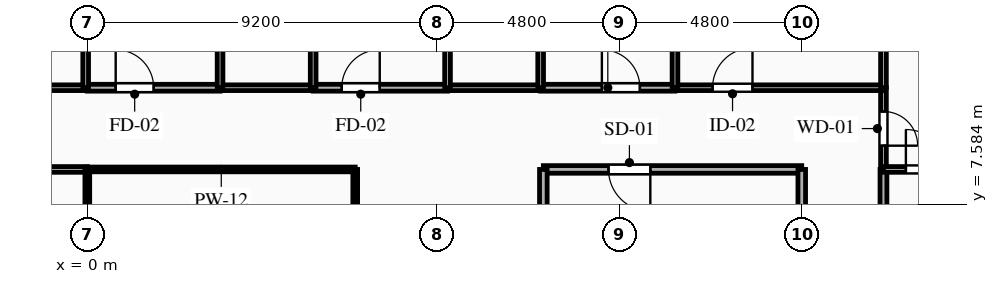
"""IFC4 building model, lengths in metres.
Left out: names, types, materials, properties, quantities, classifications, styles, units other than length and angle.
Written with IfcOpenShell. Run it as: python <this file> out.ifc"""

import sys

from ifc_helpers import new_model, si_unit, direction, frame, frame_2d, origin, place, context, subcontext, project, spatial, rectangle, extrude, element, fill, save


model = new_model("IFC4")
c1 = context("Model", 3, precision=1e-05, world=origin(), true_north=direction((0.0, 1.0)))
c2 = subcontext(c1, "Body", "Model", "MODEL_VIEW")
j1 = project(units=[si_unit("LENGTHUNIT", "METRE"), si_unit("PLANEANGLEUNIT", "RADIAN")], contexts=[c1])
p1 = place(None, origin())
s1 = spatial("IfcSite", under=j1, at=p1, CompositionType="ELEMENT")
p2 = place(p1, origin())
s2 = spatial("IfcBuilding", under=s1, at=p2, CompositionType="ELEMENT")
p3 = place(p2, frame((0.0, 0.0, 134.35)))
s3 = spatial("IfcBuildingStorey", under=s2, at=p3, CompositionType="ELEMENT", Elevation=134.35)
p4 = place(p3, frame((18.8, 8.5, 0.0), z_axis=(0.0, 0.0, 1.0), x_axis=(-1.0, 0.0, 0.0)))
e1 = element("IfcWall", 1, at=p4, inside=s3, PredefinedType="PARTITIONING", context=c2, shape_type="SweptSolid", body=[
    extrude(rectangle(XDim=6.8, YDim=0.2, at=frame_2d((3.4, 0.0))), origin(), (0.0, 0.0, 1.0), 3.04),
])
p5 = place(p4, frame((3.985, 0.0, 0.0)))
e2 = element("IfcOpeningElement", 2, at=p5, cuts=e1, PredefinedType="OPENING", context=c2, shape_type="SweptSolid", body=[
    extrude(rectangle(XDim=1.1, YDim=2.15, at=frame_2d((0.55, 1.075))), frame((0.0, 0.11, 0.0), z_axis=(0.0, -1.0, 0.0), x_axis=(1.0, 0.0, 0.0)), (0.0, 0.0, 1.0), 0.22),
])
p6 = place(p3, frame((18.8, 5.6, 0.0), z_axis=(0.0, 0.0, 1.0), x_axis=(0.0, 1.0, 0.0)))
e3 = element("IfcWall", 3, at=p6, inside=s3, PredefinedType="PARTITIONING", context=c2, shape_type="SweptSolid", body=[
    extrude(rectangle(XDim=2.9, YDim=0.2, at=frame_2d((1.45, 0.0))), origin(), (0.0, 0.0, 1.0), 2.525),
])
p7 = place(p3, frame((12.0, 8.5, 0.0), z_axis=(0.0, 0.0, 1.0), x_axis=(0.0, -1.0, 0.0)))
e4 = element("IfcWall", 4, at=p7, inside=s3, PredefinedType="PARTITIONING", context=c2, shape_type="SweptSolid", body=[
    extrude(rectangle(XDim=2.9, YDim=0.2, at=frame_2d((1.45, 0.0))), origin(), (0.0, 0.0, 1.0), 3.04),
])
p8 = place(p3, frame((-2.493, 10.65, 0.0), z_axis=(0.0, 0.0, 1.0), x_axis=(1.0, 0.0, 0.0)))
e5 = element("IfcWall", 5, at=p8, inside=s3, PredefinedType="PLUMBINGWALL", context=c2, shape_type="SweptSolid", body=[
    extrude(rectangle(XDim=2.45, YDim=0.15, at=frame_2d((1.225, 0.0))), origin(), (0.0, 0.0, 1.0), 3.04),
])
p9 = place(p3, frame((0.0, 8.5, 0.0), z_axis=(0.0, 0.0, 1.0), x_axis=(-1.0, 0.0, 0.0)))
e6 = element("IfcWall", 6, at=p9, inside=s3, PredefinedType="PARTITIONING", context=c2, shape_type="SweptSolid", body=[
    extrude(rectangle(XDim=7.05, YDim=0.15, at=frame_2d((3.525, 0.0))), origin(), (0.0, 0.0, 1.0), 3.04),
])
p10 = place(p3, frame((20.95, 10.65, 0.0), z_axis=(0.0, 0.0, 1.0), x_axis=(0.0, -1.0, 0.0)))
e7 = element("IfcWall", 7, at=p10, inside=s3, PredefinedType="PARTITIONING", context=c2, shape_type="SweptSolid", body=[
    extrude(rectangle(XDim=2.15, YDim=0.15, at=frame_2d((1.075, 0.0))), origin(), (0.0, 0.0, 1.0), 3.04),
])
p11 = place(p10, frame((0.625, 0.0, 0.0)))
e8 = element("IfcOpeningElement", 8, at=p11, cuts=e7, PredefinedType="OPENING", context=c2, shape_type="SweptSolid", body=[
    extrude(rectangle(XDim=0.9, YDim=2.1, at=frame_2d((0.45, 1.05))), frame((0.0, 0.085, 0.0), z_axis=(0.0, -1.0, 0.0), x_axis=(1.0, 0.0, 0.0)), (0.0, 0.0, 1.0), 0.17),
])
p12 = place(p3, frame((0.0, 10.65, 0.0), z_axis=(0.0, 0.0, 1.0), x_axis=(1.0, 0.0, 0.0)))
e9 = element("IfcWall", 9, at=p12, inside=s3, PredefinedType="PARTITIONING", context=c2, shape_type="SweptSolid", body=[
    extrude(rectangle(XDim=3.493, YDim=0.18, at=frame_2d((1.747, 0.0))), origin(), (0.0, 0.0, 1.0), 3.04),
])
p13 = place(p12, frame((0.747, 0.0, 0.0)))
e10 = element("IfcOpeningElement", 10, at=p13, cuts=e9, PredefinedType="OPENING", context=c2, shape_type="SweptSolid", body=[
    extrude(rectangle(XDim=1.0, YDim=2.15, at=frame_2d((0.5, 1.075))), frame((0.0, 0.1, 0.0), z_axis=(0.0, -1.0, 0.0), x_axis=(1.0, 0.0, 0.0)), (0.0, 0.0, 1.0), 0.2),
])
p14 = place(p3, frame((5.943, 10.65, 0.0), z_axis=(0.0, 0.0, 1.0), x_axis=(1.0, 0.0, 0.0)))
e11 = element("IfcWall", 11, at=p14, inside=s3, PredefinedType="PARTITIONING", context=c2, shape_type="SweptSolid", body=[
    extrude(rectangle(XDim=3.536, YDim=0.18, at=frame_2d((1.768, 0.0))), origin(), (0.0, 0.0, 1.0), 3.04),
])
p15 = place(p14, frame((0.752, 0.0, 0.0)))
e12 = element("IfcOpeningElement", 12, at=p15, cuts=e11, PredefinedType="OPENING", context=c2, shape_type="SweptSolid", body=[
    extrude(rectangle(XDim=1.0, YDim=2.15, at=frame_2d((0.5, 1.075))), frame((0.0, 0.1, 0.0), z_axis=(0.0, -1.0, 0.0), x_axis=(1.0, 0.0, 0.0)), (0.0, 0.0, 1.0), 0.2),
])
p16 = place(p3, frame((3.493, 10.65, 0.0), z_axis=(0.0, 0.0, 1.0), x_axis=(1.0, 0.0, 0.0)))
e13 = element("IfcWall", 13, at=p16, inside=s3, PredefinedType="PLUMBINGWALL", context=c2, shape_type="SweptSolid", body=[
    extrude(rectangle(XDim=2.45, YDim=0.15, at=frame_2d((1.225, 0.0))), origin(), (0.0, 0.0, 1.0), 3.04),
])
p17 = place(p3, frame((11.929, 10.65, 0.0), z_axis=(0.0, 0.0, 1.0), x_axis=(1.0, 0.0, 0.0)))
e14 = element("IfcWall", 14, at=p17, inside=s3, PredefinedType="PARTITIONING", context=c2, shape_type="SweptSolid", body=[
    extrude(rectangle(XDim=3.535, YDim=0.18, at=frame_2d((1.768, 0.0))), origin(), (0.0, 0.0, 1.0), 3.04),
])
p18 = place(p17, frame((1.611, 0.0, 0.0)))
e15 = element("IfcOpeningElement", 15, at=p18, cuts=e14, PredefinedType="OPENING", context=c2, shape_type="SweptSolid", body=[
    extrude(rectangle(XDim=1.0, YDim=2.15, at=frame_2d((0.5, 1.075))), frame((0.0, 0.1, 0.0), z_axis=(0.0, -1.0, 0.0), x_axis=(1.0, 0.0, 0.0)), (0.0, 0.0, 1.0), 0.2),
])
p19 = place(p3, frame((9.479, 10.65, 0.0), z_axis=(0.0, 0.0, 1.0), x_axis=(1.0, 0.0, 0.0)))
e16 = element("IfcWall", 16, at=p19, inside=s3, PredefinedType="PLUMBINGWALL", context=c2, shape_type="SweptSolid", body=[
    extrude(rectangle(XDim=2.45, YDim=0.15, at=frame_2d((1.225, 0.0))), origin(), (0.0, 0.0, 1.0), 3.04),
])
p20 = place(p3, frame((15.464, 10.65, 0.0), z_axis=(0.0, 0.0, 1.0), x_axis=(1.0, 0.0, 0.0)))
e17 = element("IfcWall", 17, at=p20, inside=s3, PredefinedType="PARTITIONING", context=c2, shape_type="SweptSolid", body=[
    extrude(rectangle(XDim=5.486, YDim=0.15, at=frame_2d((2.743, 0.0))), origin(), (0.0, 0.0, 1.0), 3.04),
])
p21 = place(p20, frame((0.99, 0.0, 0.0)))
e18 = element("IfcOpeningElement", 18, at=p21, cuts=e17, PredefinedType="OPENING", context=c2, shape_type="SweptSolid", body=[
    extrude(rectangle(XDim=1.05, YDim=2.15, at=frame_2d((0.525, 1.075))), frame((0.0, 0.085, 0.0), z_axis=(0.0, -1.0, 0.0), x_axis=(1.0, 0.0, 0.0)), (0.0, 0.0, 1.0), 0.17),
])
p22 = place(p3, frame((7.05, 8.5, 0.0), z_axis=(0.0, 0.0, 1.0), x_axis=(-1.0, 0.0, 0.0)))
e19 = element("IfcWall", 19, at=p22, inside=s3, PredefinedType="PARTITIONING", context=c2, shape_type="SweptSolid", body=[
    extrude(rectangle(XDim=7.05, YDim=0.125, at=frame_2d((3.525, 0.0))), origin(), (0.0, 0.0, 1.0), 3.04),
])
p23 = place(p3, frame((20.95, 8.5, 0.0), z_axis=(0.0, 0.0, 1.0), x_axis=(0.0, -1.0, 0.0)))
e20 = element("IfcWall", 20, at=p23, inside=s3, PredefinedType="PARTITIONING", context=c2, shape_type="SweptSolid", body=[
    extrude(rectangle(XDim=14.1, YDim=0.18, at=frame_2d((7.05, 0.0))), origin(), (0.0, 0.0, 1.0), 3.04),
])
p24 = place(p23, frame((8.042, 0.0, 0.0)))
e21 = element("IfcOpeningElement", 21, at=p24, cuts=e20, PredefinedType="OPENING", context=c2, shape_type="SweptSolid", body=[
    extrude(rectangle(XDim=1.0, YDim=2.15, at=frame_2d((0.5, 1.075))), frame((0.0, 0.1, 0.0), z_axis=(0.0, -1.0, 0.0), x_axis=(1.0, 0.0, 0.0)), (0.0, 0.0, 1.0), 0.2),
])
p25 = place(p3, frame((7.05, -0.8, 0.0), z_axis=(0.0, 0.0, 1.0), x_axis=(0.0, 1.0, 0.0)))
e22 = element("IfcWall", 22, at=p25, inside=s3, PredefinedType="PARTITIONING", context=c2, shape_type="SweptSolid", body=[
    extrude(rectangle(XDim=9.3, YDim=0.125, at=frame_2d((4.65, 0.0))), origin(), (0.0, 0.0, 1.0), 3.04),
])
p26 = place(p25, frame((1.479, 0.0, 0.0)))
e23 = element("IfcOpeningElement", 23, at=p26, cuts=e22, PredefinedType="OPENING", context=c2, shape_type="SweptSolid", body=[
    extrude(rectangle(XDim=0.95, YDim=2.1, at=frame_2d((0.475, 1.05))), frame((0.0, 0.073, 0.0), z_axis=(0.0, -1.0, 0.0), x_axis=(1.0, 0.0, 0.0)), (0.0, 0.0, 1.0), 0.145),
])
p27 = place(p3, frame((20.95, 8.5, 0.0), z_axis=(0.0, 0.0, 1.0), x_axis=(1.0, 0.0, 0.0)))
e24 = element("IfcWall", 24, at=p27, inside=s3, PredefinedType="PARTITIONING", context=c2, shape_type="SweptSolid", body=[
    extrude(rectangle(XDim=2.23, YDim=0.15, at=frame_2d((1.115, 0.0))), origin(), (0.0, 0.0, 1.0), 3.04),
])
p28 = place(p27, frame((0.59, 0.0, 0.0)))
e25 = element("IfcOpeningElement", 25, at=p28, cuts=e24, PredefinedType="OPENING", context=c2, shape_type="SweptSolid", body=[
    extrude(rectangle(XDim=1.05, YDim=2.15, at=frame_2d((0.525, 1.075))), frame((0.0, 0.085, 0.0), z_axis=(0.0, -1.0, 0.0), x_axis=(1.0, 0.0, 0.0)), (0.0, 0.0, 1.0), 0.17),
])
p29 = place(p3, frame((20.95, 10.65, 0.0), z_axis=(0.0, 0.0, 1.0), x_axis=(0.0, 1.0, 0.0)))
e26 = element("IfcWall", 26, at=p29, inside=s3, PredefinedType="PARTITIONING", context=c2, shape_type="SweptSolid", body=[
    extrude(rectangle(XDim=9.75, YDim=0.15, at=frame_2d((4.875, 0.0))), origin(), (0.0, 0.0, 1.0), 2.525),
])
for number, where, z_axis, x_axis in (
    (27, (-0.043, 10.65, 0.0), (0.0, 0.0, 1.0), (0.0, 1.0, 0.0)),
    (28, (3.493, 12.8, 0.0), (0.0, 0.0, 1.0), (0.0, -1.0, 0.0)),
    (29, (5.943, 10.65, 0.0), (0.0, 0.0, 1.0), (0.0, 1.0, 0.0)),
    (30, (9.479, 12.8, 0.0), (0.0, 0.0, 1.0), (0.0, -1.0, 0.0)),
    (31, (11.929, 10.65, 0.0), (0.0, 0.0, 1.0), (0.0, 1.0, 0.0)),
):
    element("IfcWall", number, at=place(p3, frame(where, z_axis=z_axis, x_axis=x_axis)), inside=s3, PredefinedType="PLUMBINGWALL", context=c2, shape_type="SweptSolid", body=[
        extrude(rectangle(XDim=2.15, YDim=0.15, at=frame_2d((1.075, 0.0))), origin(), (0.0, 0.0, 1.0), 3.04),
    ])
p30 = place(p3, frame((15.464, 20.4, 0.0), z_axis=(0.0, 0.0, 1.0), x_axis=(0.0, -1.0, 0.0)))
e32 = element("IfcWall", 32, at=p30, inside=s3, PredefinedType="PARTITIONING", context=c2, shape_type="SweptSolid", body=[
    extrude(rectangle(XDim=9.75, YDim=0.15, at=frame_2d((4.875, 0.0))), origin(), (0.0, 0.0, 1.0), 2.525),
])
p31 = place(p3, frame((0.0, 8.5, 0.0), z_axis=(0.0, 0.0, 1.0), x_axis=(0.0, -1.0, 0.0)))
e33 = element("IfcWall", 33, at=p31, inside=s3, PredefinedType="PARTITIONING", context=c2, shape_type="SweptSolid", body=[
    extrude(rectangle(XDim=9.3, YDim=0.125, at=frame_2d((4.65, 0.0))), origin(), (0.0, 0.0, 1.0), 3.04),
])
p32 = place(p5, origin())
e34 = element("IfcDoor", 34, at=p32, inside=s3, OperationType="SINGLE_SWING_LEFT", PredefinedType="DOOR", context=c2, shape_type="SweptSolid", body=[
    extrude(rectangle(XDim=1.1, YDim=2.15, at=frame_2d((0.55, 1.075))), frame((0.0, 0.025, 0.0), z_axis=(0.0, -1.0, 0.0), x_axis=(1.0, 0.0, 0.0)), (0.0, 0.0, 1.0), 0.05),
])
fill(e2, e34)
p33 = place(p11, origin())
e35 = element("IfcDoor", 35, at=p33, inside=s3, OperationType="SINGLE_SWING_RIGHT", PredefinedType="DOOR", context=c2, shape_type="SweptSolid", body=[
    extrude(rectangle(XDim=0.9, YDim=2.1, at=frame_2d((0.45, 1.05))), frame((0.0, 0.025, 0.0), z_axis=(0.0, -1.0, 0.0), x_axis=(1.0, 0.0, 0.0)), (0.0, 0.0, 1.0), 0.05),
])
fill(e8, e35)
p34 = place(p13, origin())
e36 = element("IfcDoor", 36, at=p34, inside=s3, OperationType="SINGLE_SWING_LEFT", PredefinedType="DOOR", context=c2, shape_type="SweptSolid", body=[
    extrude(rectangle(XDim=1.0, YDim=2.15, at=frame_2d((0.5, 1.075))), frame((0.0, 0.025, 0.0), z_axis=(0.0, -1.0, 0.0), x_axis=(1.0, 0.0, 0.0)), (0.0, 0.0, 1.0), 0.05),
])
fill(e10, e36)
p35 = place(p15, origin())
e37 = element("IfcDoor", 37, at=p35, inside=s3, OperationType="SINGLE_SWING_RIGHT", PredefinedType="DOOR", context=c2, shape_type="SweptSolid", body=[
    extrude(rectangle(XDim=1.0, YDim=2.15, at=frame_2d((0.5, 1.075))), frame((0.0, 0.025, 0.0), z_axis=(0.0, -1.0, 0.0), x_axis=(1.0, 0.0, 0.0)), (0.0, 0.0, 1.0), 0.05),
])
fill(e12, e37)
p36 = place(p18, origin())
e38 = element("IfcDoor", 38, at=p36, inside=s3, OperationType="SINGLE_SWING_LEFT", PredefinedType="DOOR", context=c2, shape_type="SweptSolid", body=[
    extrude(rectangle(XDim=1.0, YDim=2.15, at=frame_2d((0.5, 1.075))), frame((0.0, 0.025, 0.0), z_axis=(0.0, -1.0, 0.0), x_axis=(1.0, 0.0, 0.0)), (0.0, 0.0, 1.0), 0.05),
])
fill(e15, e38)
p37 = place(p21, origin())
e39 = element("IfcDoor", 39, at=p37, inside=s3, OperationType="SINGLE_SWING_RIGHT", PredefinedType="DOOR", context=c2, shape_type="SweptSolid", body=[
    extrude(rectangle(XDim=1.05, YDim=2.15, at=frame_2d((0.525, 1.075))), frame((0.0, 0.025, 0.0), z_axis=(0.0, -1.0, 0.0), x_axis=(1.0, 0.0, 0.0)), (0.0, 0.0, 1.0), 0.05),
])
fill(e18, e39)
p38 = place(p28, origin())
e40 = element("IfcDoor", 40, at=p38, inside=s3, OperationType="SINGLE_SWING_LEFT", PredefinedType="DOOR", context=c2, shape_type="SweptSolid", body=[
    extrude(rectangle(XDim=1.05, YDim=2.15, at=frame_2d((0.525, 1.075))), frame((0.0, 0.025, 0.0), z_axis=(0.0, -1.0, 0.0), x_axis=(1.0, 0.0, 0.0)), (0.0, 0.0, 1.0), 0.05),
])
fill(e25, e40)
save(model, sys.argv[1])
